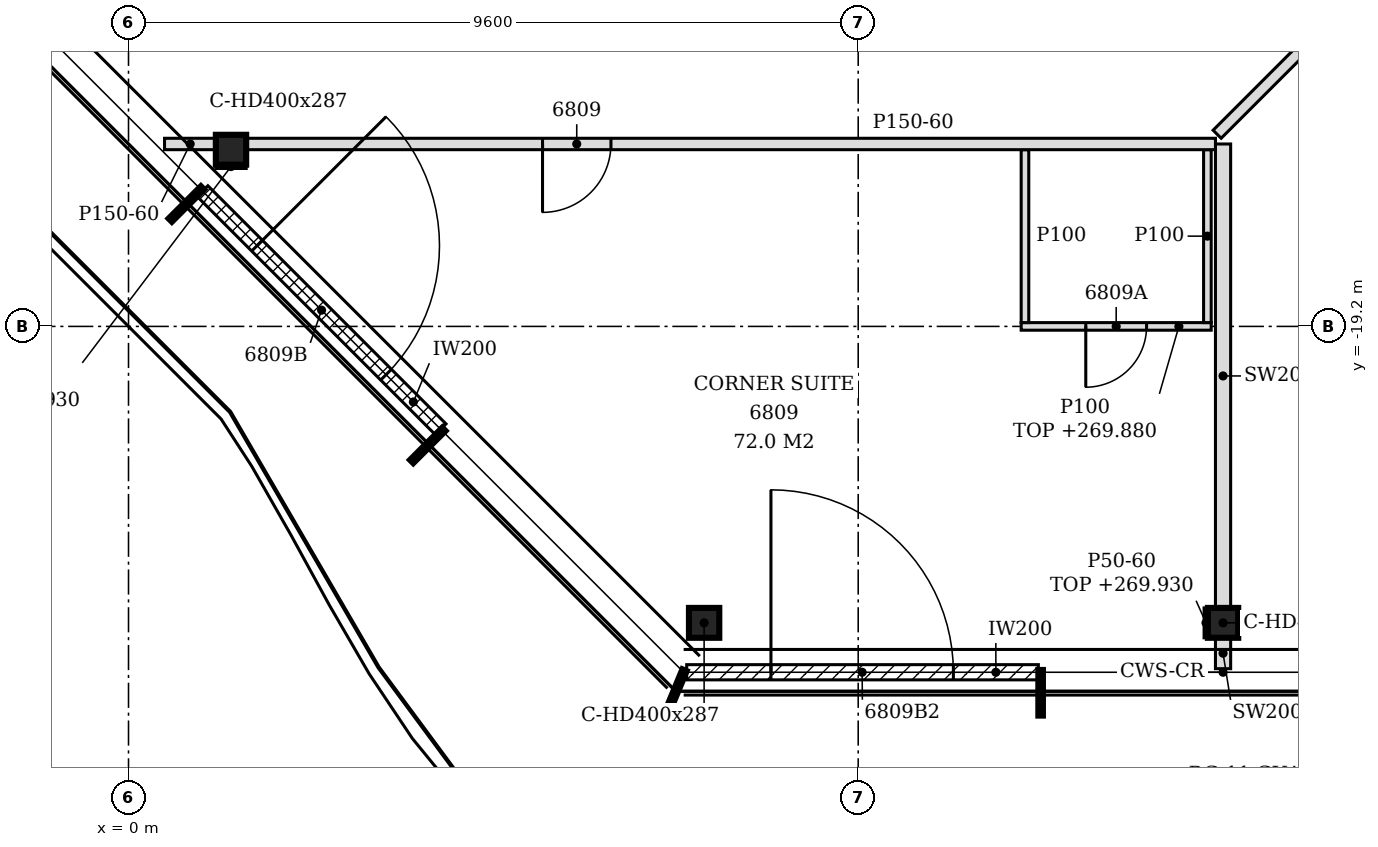
"""IFC4 building model, lengths in metres.
Left out: names, types, materials, properties, quantities, classifications, styles, units other than length and angle.
Written with IfcOpenShell. Run it as: python <this file> out.ifc"""

import sys

from ifc_helpers import new_model, si_unit, direction, frame, frame_2d, origin, origin_2d, place, context, subcontext, project, spatial, polyline, rectangle, i_section, outline, extrude, element, fill, save


model = new_model("IFC4")
c1 = context("Model", 3, precision=1e-05, world=origin(), true_north=direction((0.0, 1.0)))
c2 = subcontext(c1, "Body", "Model", "MODEL_VIEW")
j1 = project(units=[si_unit("LENGTHUNIT", "METRE"), si_unit("PLANEANGLEUNIT", "RADIAN")], contexts=[c1])
p1 = place(None, origin())
s1 = spatial("IfcSite", under=j1, at=p1, CompositionType="ELEMENT")
p2 = place(p1, origin())
s2 = spatial("IfcBuilding", under=s1, at=p2, CompositionType="ELEMENT")
p3 = place(p2, frame((0.0, 0.0, 267.0)))
s3 = spatial("IfcBuildingStorey", under=s2, at=p3, CompositionType="ELEMENT", Elevation=267.0)
for number, where, z_axis, x_axis in (
    (1, (7.573, -23.1, -0.15), (0.0, 0.0, 1.0), (1.0, 0.0, 0.0)),
    (2, (14.4, -23.1, -0.15), (0.0, 0.0, 1.0), (1.0, 0.0, 0.0)),
    (3, (1.348, -16.876, -0.15), (0.0, 0.0, 1.0), (1.0, 0.0, 0.0)),
):
    element("IfcColumn", number, at=place(p3, frame(where, z_axis=z_axis, x_axis=x_axis)), inside=s3, PredefinedType="COLUMN", context=c2, shape_type="SweptSolid", body=[
        extrude(i_section(OverallWidth=0.399, OverallDepth=0.393, WebThickness=0.023, FlangeThickness=0.037, FilletRadius=0.015, at=origin_2d()), origin(), (0.0, 0.0, 1.0), 3.6),
    ])
p4 = place(p3, frame((7.344, -23.75, 0.0), z_axis=(0.0, 0.0, 1.0), x_axis=(1.0, 0.0, 0.0)))
e4 = element("IfcWall", 4, at=p4, inside=s3, PredefinedType="NOTDEFINED", context=c2, shape_type="SweptSolid", body=[
    extrude(rectangle(XDim=4.626, YDim=0.2, at=frame_2d((2.313, 0.0))), origin(), (0.0, 0.0, 1.0), 3.45),
])
p5 = place(p4, frame((1.108, 0.0, 0.0)))
e5 = element("IfcOpeningElement", 5, at=p5, cuts=e4, PredefinedType="OPENING", context=c2, shape_type="SweptSolid", body=[
    extrude(rectangle(XDim=2.4, YDim=2.4, at=frame_2d((1.2, 1.2))), frame((0.0, 0.11, 0.0), z_axis=(0.0, -1.0, 0.0), x_axis=(1.0, 0.0, 0.0)), (0.0, 0.0, 1.0), 0.22),
])
p6 = place(p3, frame((0.974, -17.42, 0.0), z_axis=(0.0, 0.0, 1.0), x_axis=(0.707079231393, -0.707134329907, 0.0)))
e6 = element("IfcWall", 6, at=p6, inside=s3, PredefinedType="NOTDEFINED", context=c2, shape_type="SweptSolid", body=[
    extrude(rectangle(XDim=4.431, YDim=0.2, at=frame_2d((2.215, 0.0))), origin(), (0.0, 0.0, 1.0), 3.45),
])
p7 = place(p6, frame((1.015, 0.0, 0.0)))
e7 = element("IfcOpeningElement", 7, at=p7, cuts=e6, PredefinedType="OPENING", context=c2, shape_type="SweptSolid", body=[
    extrude(rectangle(XDim=2.4, YDim=2.4, at=frame_2d((1.2, 1.2))), frame((0.0, 0.11, 0.0), z_axis=(0.0, -1.0, 0.0), x_axis=(1.0, 0.0, 0.0)), (0.0, 0.0, 1.0), 0.22),
])
p8 = place(p3, frame((14.4, -23.703, 0.0), z_axis=(0.0, 0.0, 1.0), x_axis=(0.0, 1.0, 0.0)))
e8 = element("IfcWall", 8, at=p8, inside=s3, PredefinedType="PARTITIONING", context=c2, shape_type="SweptSolid", body=[
    extrude(rectangle(XDim=0.406, YDim=0.2, at=frame_2d((0.203, 0.0))), origin(), (0.0, 0.0, 1.0), 3.45),
])
p9 = place(p3, frame((14.4, -22.904, 0.0), z_axis=(0.0, 0.0, 1.0), x_axis=(0.0, 1.0, 0.0)))
e9 = element("IfcWall", 9, at=p9, inside=s3, PredefinedType="PARTITIONING", context=c2, shape_type="SweptSolid", body=[
    extrude(outline(polyline([(0.0, 0.0), (6.104, 0.0), (6.104, 3.45), (3.809, 3.45), (3.806, 2.88), (3.598, 2.88), (3.596, 3.45), (0.0, 3.45), (0.0, 0.0)])), frame((0.0, 0.1, 0.0), z_axis=(0.0, -1.0, 0.0), x_axis=(1.0, 0.0, 0.0)), (0.0, 0.0, 1.0), 0.2),
])
p10 = place(p3, frame((11.744, -19.2, 0.0), z_axis=(0.0, 0.0, 1.0), x_axis=(1.0, 0.0, 0.0)))
e10 = element("IfcWall", 10, at=p10, inside=s3, PredefinedType="PARTITIONING", context=c2, shape_type="SweptSolid", body=[
    extrude(rectangle(XDim=2.5, YDim=0.1, at=frame_2d((1.25, 0.0))), origin(), (0.0, 0.0, 1.0), 2.88),
])
p11 = place(p10, frame((0.85, 0.0, 0.0)))
e11 = element("IfcOpeningElement", 11, at=p11, cuts=e10, PredefinedType="OPENING", context=c2, shape_type="SweptSolid", body=[
    extrude(rectangle(XDim=0.8, YDim=2.1, at=frame_2d((0.4, 1.05))), frame((0.0, 0.06, 0.0), z_axis=(0.0, -1.0, 0.0), x_axis=(1.0, 0.0, 0.0)), (0.0, 0.0, 1.0), 0.12),
])
for number, where, z_axis, x_axis in (
    (12, (11.794, -19.15, 0.0), (0.0, 0.0, 1.0), (0.0, 1.0, 0.0)),
    (13, (14.194, -19.15, 0.0), (0.0, 0.0, 1.0), (0.0, 1.0, 0.0)),
):
    element("IfcWall", number, at=place(p3, frame(where, z_axis=z_axis, x_axis=x_axis)), inside=s3, PredefinedType="PARTITIONING", context=c2, shape_type="SweptSolid", body=[
        extrude(outline(polyline([(0.0, 0.0), (2.275, 0.0), (2.275, 3.45), (0.055, 3.45), (0.053, 2.88), (0.0, 2.88), (0.0, 0.0)])), frame((0.0, 0.05, 0.0), z_axis=(0.0, -1.0, 0.0), x_axis=(1.0, 0.0, 0.0)), (0.0, 0.0, 1.0), 0.1),
    ])
p12 = place(p3, frame((0.474, -16.8, 0.0), z_axis=(0.0, 0.0, 1.0), x_axis=(1.0, 0.0, 0.0)))
e14 = element("IfcWall", 14, at=p12, inside=s3, PredefinedType="PARTITIONING", context=c2, shape_type="SweptSolid", body=[
    extrude(outline(polyline([(0.0, 0.0), (0.675, 0.0), (0.675, 2.63), (0.229, 2.63), (0.227, 3.45), (0.0, 3.45), (0.0, 0.0)])), frame((0.0, 0.075, 0.0), z_axis=(0.0, -1.0, 0.0), x_axis=(1.0, 0.0, 0.0)), (0.0, 0.0, 1.0), 0.15),
])
p13 = place(p3, frame((1.548, -16.8, 0.0), z_axis=(0.0, 0.0, 1.0), x_axis=(1.0, 0.0, 0.0)))
e15 = element("IfcWall", 15, at=p13, inside=s3, PredefinedType="PARTITIONING", context=c2, shape_type="SweptSolid", body=[
    extrude(outline(polyline([(0.0, 0.0), (12.752, 0.0), (12.752, 3.45), (5.802, 3.45), (5.8, 2.73), (5.502, 2.73), (5.5, 3.45), (0.0, 3.45), (0.0, 0.0)])), frame((0.0, 0.075, 0.0), z_axis=(0.0, -1.0, 0.0), x_axis=(1.0, 0.0, 0.0)), (0.0, 0.0, 1.0), 0.15),
])
p14 = place(p13, frame((3.899, 0.0, 0.0)))
e16 = element("IfcOpeningElement", 16, at=p14, cuts=e15, PredefinedType="OPENING", context=c2, shape_type="SweptSolid", body=[
    extrude(rectangle(XDim=0.9, YDim=2.1, at=frame_2d((0.45, 1.05))), frame((0.0, 0.085, 0.0), z_axis=(0.0, -1.0, 0.0), x_axis=(1.0, 0.0, 0.0)), (0.0, 0.0, 1.0), 0.17),
])
p15 = place(p3, frame((14.322, -16.672, 0.0), z_axis=(0.0, 0.0, 1.0), x_axis=(0.707106781187, 0.707106781187, 0.0)))
e17 = element("IfcWall", 17, at=p15, inside=s3, PredefinedType="PARTITIONING", context=c2, shape_type="SweptSolid", body=[
    extrude(rectangle(XDim=23.452, YDim=0.15, at=frame_2d((11.726, 0.0))), origin(), (0.0, 0.0, 1.0), 2.73),
])
p16 = place(p15, frame((19.357, 0.0, 0.0)))
e18 = element("IfcOpeningElement", 18, at=p16, cuts=e17, PredefinedType="OPENING", context=c2, shape_type="SweptSolid", body=[
    extrude(rectangle(XDim=1.8, YDim=2.1, at=frame_2d((0.9, 1.05))), frame((0.0, 0.085, 0.0), z_axis=(0.0, -1.0, 0.0), x_axis=(1.0, 0.0, 0.0)), (0.0, 0.0, 1.0), 0.17),
])
p17 = place(p15, frame((2.975, 0.0, 0.0)))
e19 = element("IfcOpeningElement", 19, at=p17, cuts=e17, PredefinedType="OPENING", context=c2, shape_type="SweptSolid", body=[
    extrude(rectangle(XDim=0.9, YDim=2.1, at=frame_2d((0.45, 1.05))), frame((0.0, 0.085, 0.0), z_axis=(0.0, -1.0, 0.0), x_axis=(1.0, 0.0, 0.0)), (0.0, 0.0, 1.0), 0.17),
])
p18 = place(p15, frame((12.587, 0.0, 0.0)))
e20 = element("IfcOpeningElement", 20, at=p18, cuts=e17, PredefinedType="OPENING", context=c2, shape_type="SweptSolid", body=[
    extrude(rectangle(XDim=0.9, YDim=2.1, at=frame_2d((0.45, 1.05))), frame((0.0, 0.085, 0.0), z_axis=(0.0, -1.0, 0.0), x_axis=(1.0, 0.0, 0.0)), (0.0, 0.0, 1.0), 0.17),
])
p19 = place(p3, frame((14.176, -23.296, 0.0), z_axis=(0.0, 0.0, 1.0), x_axis=(0.0, 1.0, 0.0)))
e21 = element("IfcWall", 21, at=p19, inside=s3, PredefinedType="PARTITIONING", context=c2, shape_type="SweptSolid", body=[
    extrude(rectangle(XDim=0.393, YDim=0.05, at=frame_2d((0.196, 0.0))), origin(), (0.0, 0.0, 1.0), 2.93),
])
p20 = place(p3, frame((1.149, -17.097, 0.0), z_axis=(0.0, 0.0, 1.0), x_axis=(1.0, 0.0, 0.0)))
e22 = element("IfcWall", 22, at=p20, inside=s3, PredefinedType="PARTITIONING", context=c2, shape_type="SweptSolid", body=[
    extrude(rectangle(XDim=0.399, YDim=0.05, at=frame_2d((0.2, 0.0))), origin(), (0.0, 0.0, 1.0), 2.93),
])
p21 = place(p5, origin())
e23 = element("IfcDoor", 23, at=p21, inside=s3, OperationType="SINGLE_SWING_LEFT", PredefinedType="DOOR", context=c2, shape_type="SweptSolid", body=[
    extrude(rectangle(XDim=2.4, YDim=2.4, at=frame_2d((1.2, 1.2))), frame((0.0, 0.025, 0.0), z_axis=(0.0, -1.0, 0.0), x_axis=(1.0, 0.0, 0.0)), (0.0, 0.0, 1.0), 0.05),
])
fill(e5, e23)
p22 = place(p7, origin())
e24 = element("IfcDoor", 24, at=p22, inside=s3, OperationType="SINGLE_SWING_LEFT", PredefinedType="DOOR", context=c2, shape_type="SweptSolid", body=[
    extrude(rectangle(XDim=2.4, YDim=2.4, at=frame_2d((1.2, 1.2))), frame((0.0, 0.025, 0.0), z_axis=(0.0, -1.0, 0.0), x_axis=(1.0, 0.0, 0.0)), (0.0, 0.0, 1.0), 0.05),
])
fill(e7, e24)
p23 = place(p14, frame((0.9, 0.0, 0.0), z_axis=(0.0, 0.0, 1.0), x_axis=(-1.0, 0.0, 0.0)))
e25 = element("IfcDoor", 25, at=p23, inside=s3, OperationType="SINGLE_SWING_RIGHT", PredefinedType="DOOR", context=c2, shape_type="SweptSolid", body=[
    extrude(rectangle(XDim=0.9, YDim=2.1, at=frame_2d((0.45, 1.05))), frame((0.0, 0.025, 0.0), z_axis=(0.0, -1.0, 0.0), x_axis=(1.0, 0.0, 0.0)), (0.0, 0.0, 1.0), 0.05),
])
fill(e16, e25)
p24 = place(p11, frame((0.8, 0.0, 0.0), z_axis=(0.0, 0.0, 1.0), x_axis=(-1.0, 0.0, 0.0)))
e26 = element("IfcDoor", 26, at=p24, inside=s3, OperationType="SINGLE_SWING_RIGHT", PredefinedType="DOOR", context=c2, shape_type="SweptSolid", body=[
    extrude(rectangle(XDim=0.8, YDim=2.1, at=frame_2d((0.4, 1.05))), frame((0.0, 0.025, 0.0), z_axis=(0.0, -1.0, 0.0), x_axis=(1.0, 0.0, 0.0)), (0.0, 0.0, 1.0), 0.05),
])
fill(e11, e26)
save(model, sys.argv[1])
